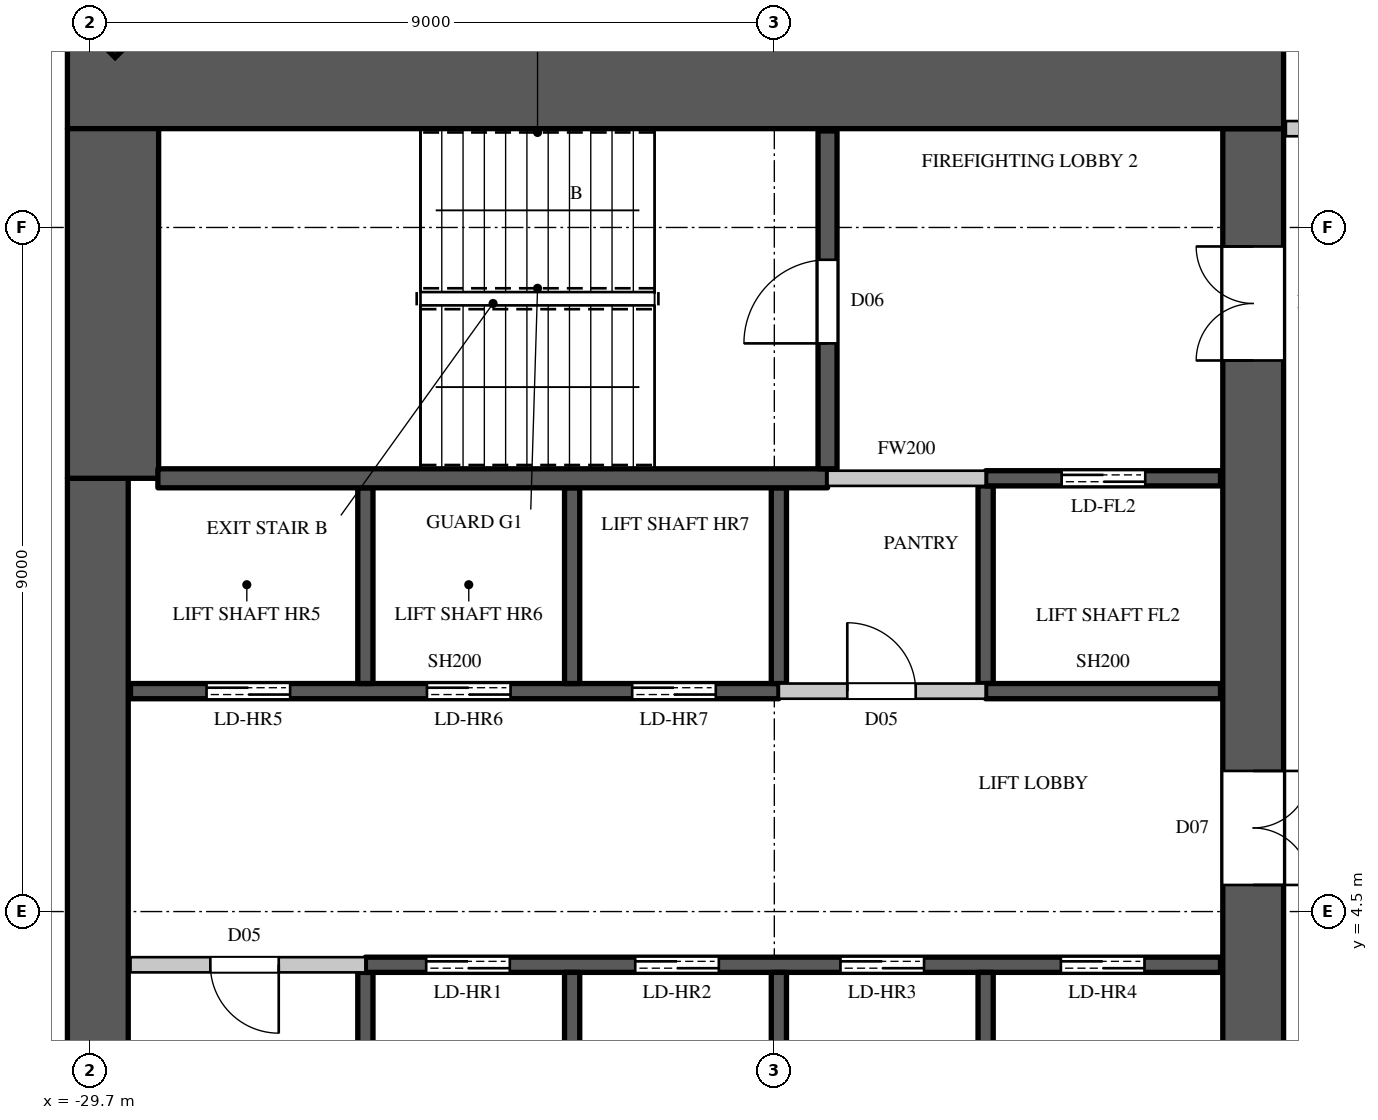
"""IFC4 building model, lengths in metres.
Left out: names, types, materials, properties, quantities, classifications, styles, units other than length and angle.
Written with IfcOpenShell. Run it as: python <this file> out.ifc"""

import sys

from ifc_helpers import new_model, si_unit, direction, frame, frame_2d, origin, origin_2d, place, context, subcontext, project, spatial, rectangle, extrude, element, fill, save


model = new_model("IFC4")
c1 = context("Model", 3, precision=1e-05, world=origin(), true_north=direction((0.0, 1.0)))
c2 = subcontext(c1, "Body", "Model", "MODEL_VIEW")
j1 = project(units=[si_unit("LENGTHUNIT", "METRE"), si_unit("PLANEANGLEUNIT", "RADIAN")], contexts=[c1])
p1 = place(None, origin())
s1 = spatial("IfcSite", under=j1, at=p1, CompositionType="ELEMENT")
p2 = place(p1, origin())
s2 = spatial("IfcBuilding", under=s1, at=p2, CompositionType="ELEMENT")
p3 = place(p2, frame((0.0, 0.0, 197.4)))
s3 = spatial("IfcBuildingStorey", under=s2, at=p3, CompositionType="ELEMENT", Elevation=197.4)
p4 = place(p3, frame((-29.443, 16.443, 0.0), z_axis=(0.0, 0.0, 1.0), x_axis=(-0.707106781187, -0.707106781187, 0.0)))
e1 = element("IfcColumn", 1, at=p4, inside=s3, PredefinedType="COLUMN", context=c2, shape_type="SweptSolid", body=[
    extrude(rectangle(XDim=0.9, YDim=1.1, at=origin_2d()), origin(), (0.0, 0.0, 1.0), 4.1),
])
p5 = place(p3, frame((-30.0, 15.4, 0.0), z_axis=(0.0, 0.0, 1.0), x_axis=(1.0, 0.0, 0.0)))
e2 = element("IfcWall", 2, at=p5, inside=s3, PredefinedType="SHEAR", context=c2, shape_type="SweptSolid", body=[
    extrude(rectangle(XDim=16.0, YDim=1.2, at=frame_2d((8.0, 0.0))), origin(), (0.0, 0.0, 1.0), 4.1),
])
p6 = place(p3, frame((-14.4, -14.8, 0.0), z_axis=(0.0, 0.0, 1.0), x_axis=(0.0, 1.0, 0.0)))
e3 = element("IfcWall", 3, at=p6, inside=s3, PredefinedType="SHEAR", context=c2, shape_type="SweptSolid", body=[
    extrude(rectangle(XDim=29.6, YDim=0.8, at=frame_2d((14.8, 0.0))), origin(), (0.0, 0.0, 1.0), 4.1),
])
p7 = place(p6, frame((1.55, 0.0, 0.0)))
e4 = element("IfcOpeningElement", 4, at=p7, cuts=e3, PredefinedType="OPENING", context=c2, shape_type="SweptSolid", body=[
    extrude(rectangle(XDim=1.5, YDim=2.4, at=frame_2d((0.75, 1.2))), frame((0.0, 0.41, 0.0), z_axis=(0.0, -1.0, 0.0), x_axis=(1.0, 0.0, 0.0)), (0.0, 0.0, 1.0), 0.82),
])
p8 = place(p6, frame((26.55, 0.0, 0.0)))
e5 = element("IfcOpeningElement", 5, at=p8, cuts=e3, PredefinedType="OPENING", context=c2, shape_type="SweptSolid", body=[
    extrude(rectangle(XDim=1.5, YDim=2.4, at=frame_2d((0.75, 1.2))), frame((0.0, 0.41, 0.0), z_axis=(0.0, -1.0, 0.0), x_axis=(1.0, 0.0, 0.0)), (0.0, 0.0, 1.0), 0.82),
])
p9 = place(p6, frame((8.45, 0.0, 0.0)))
e6 = element("IfcOpeningElement", 6, at=p9, cuts=e3, PredefinedType="OPENING", context=c2, shape_type="SweptSolid", body=[
    extrude(rectangle(XDim=1.5, YDim=2.4, at=frame_2d((0.75, 1.2))), frame((0.0, 0.41, 0.0), z_axis=(0.0, -1.0, 0.0), x_axis=(1.0, 0.0, 0.0)), (0.0, 0.0, 1.0), 0.82),
])
p10 = place(p6, frame((19.65, 0.0, 0.0)))
e7 = element("IfcOpeningElement", 7, at=p10, cuts=e3, PredefinedType="OPENING", context=c2, shape_type="SweptSolid", body=[
    extrude(rectangle(XDim=1.5, YDim=2.4, at=frame_2d((0.75, 1.2))), frame((0.0, 0.41, 0.0), z_axis=(0.0, -1.0, 0.0), x_axis=(1.0, 0.0, 0.0)), (0.0, 0.0, 1.0), 0.82),
])
p11 = place(p6, frame((14.5, 0.0, 0.0)))
e8 = element("IfcOpeningElement", 8, at=p11, cuts=e3, PredefinedType="OPENING", context=c2, shape_type="SweptSolid", body=[
    extrude(rectangle(XDim=0.6, YDim=2.0, at=frame_2d((0.3, 1.0))), frame((0.0, 0.41, 0.0), z_axis=(0.0, -1.0, 0.0), x_axis=(1.0, 0.0, 0.0)), (0.0, 0.0, 1.0), 0.82),
])
p12 = place(p3, frame((-29.6, -10.2, 0.0), z_axis=(0.0, 0.0, 1.0), x_axis=(0.0, 1.0, 0.0)))
e9 = element("IfcWall", 9, at=p12, inside=s3, PredefinedType="SHEAR", context=c2, shape_type="SweptSolid", body=[
    extrude(rectangle(XDim=20.4, YDim=0.8, at=frame_2d((10.2, 0.0))), origin(), (0.0, 0.0, 1.0), 4.1),
])
p13 = place(p3, frame((-29.4, 10.2, 0.0), z_axis=(0.0, 0.0, 1.0), x_axis=(0.0, 1.0, 0.0)))
e10 = element("IfcWall", 10, at=p13, inside=s3, PredefinedType="SHEAR", context=c2, shape_type="SweptSolid", body=[
    extrude(rectangle(XDim=4.6, YDim=1.2, at=frame_2d((2.3, 0.0))), origin(), (0.0, 0.0, 1.0), 4.1),
])
p14 = place(p3, frame((-29.17, 3.8, 0.0), z_axis=(0.0, 0.0, 1.0), x_axis=(1.0, 0.0, 0.0)))
e11 = element("IfcWall", 11, at=p14, inside=s3, PredefinedType="PARTITIONING", context=c2, shape_type="SweptSolid", body=[
    extrude(rectangle(XDim=3.09, YDim=0.2, at=frame_2d((1.545, 0.0))), origin(), (0.0, 0.0, 1.0), 3.8),
])
p15 = place(p14, frame((1.05, 0.0, 0.0)))
e12 = element("IfcOpeningElement", 12, at=p15, cuts=e11, PredefinedType="OPENING", context=c2, shape_type="SweptSolid", body=[
    extrude(rectangle(XDim=0.9, YDim=2.2, at=frame_2d((0.45, 1.1))), frame((0.0, 0.11, 0.0), z_axis=(0.0, -1.0, 0.0), x_axis=(1.0, 0.0, 0.0)), (0.0, 0.0, 1.0), 0.22),
])
p16 = place(p3, frame((-20.64, 7.4, 0.0), z_axis=(0.0, 0.0, 1.0), x_axis=(1.0, 0.0, 0.0)))
e13 = element("IfcWall", 13, at=p16, inside=s3, PredefinedType="PARTITIONING", context=c2, shape_type="SweptSolid", body=[
    extrude(rectangle(XDim=2.72, YDim=0.2, at=frame_2d((1.36, 0.0))), origin(), (0.0, 0.0, 1.0), 3.8),
])
p17 = place(p16, frame((0.9, 0.0, 0.0)))
e14 = element("IfcOpeningElement", 14, at=p17, cuts=e13, PredefinedType="OPENING", context=c2, shape_type="SweptSolid", body=[
    extrude(rectangle(XDim=0.9, YDim=2.2, at=frame_2d((0.45, 1.1))), frame((0.0, 0.11, 0.0), z_axis=(0.0, -1.0, 0.0), x_axis=(1.0, 0.0, 0.0)), (0.0, 0.0, 1.0), 0.22),
])
p18 = place(p3, frame((-20.0, 10.2, 0.0), z_axis=(0.0, 0.0, 1.0), x_axis=(1.0, 0.0, 0.0)))
e15 = element("IfcWall", 15, at=p18, inside=s3, PredefinedType="PARTITIONING", context=c2, shape_type="SweptSolid", body=[
    extrude(rectangle(XDim=2.08, YDim=0.2, at=frame_2d((1.04, 0.0))), origin(), (0.0, 0.0, 1.0), 3.8),
])
p19 = place(p3, frame((-13.97, 14.8, 0.0), z_axis=(0.0, 0.0, 1.0), x_axis=(1.0, 0.0, 0.0)))
e16 = element("IfcWall", 16, at=p19, inside=s3, PredefinedType="PARTITIONING", context=c2, shape_type="SweptSolid", body=[
    extrude(rectangle(XDim=2.87, YDim=0.2, at=frame_2d((1.435, 0.0))), origin(), (0.0, 0.0, 1.0), 3.8),
])
p20 = place(p3, frame((-29.17, 7.4, 0.0), z_axis=(0.0, 0.0, 1.0), x_axis=(1.0, 0.0, 0.0)))
e17 = element("IfcWall", 17, at=p20, inside=s3, PredefinedType="SHEAR", context=c2, shape_type="SweptSolid", body=[
    extrude(rectangle(XDim=8.53, YDim=0.2, at=frame_2d((4.265, 0.0))), origin(), (0.0, 0.0, 1.0), 3.8),
])
p21 = place(p20, frame((1.0, 0.0, 0.0)))
e18 = element("IfcOpeningElement", 18, at=p21, cuts=e17, PredefinedType="OPENING", context=c2, shape_type="SweptSolid", body=[
    extrude(rectangle(XDim=1.1, YDim=2.2, at=frame_2d((0.55, 1.1))), frame((0.0, 0.11, 0.0), z_axis=(0.0, -1.0, 0.0), x_axis=(1.0, 0.0, 0.0)), (0.0, 0.0, 1.0), 0.22),
])
p22 = place(p20, frame((3.9, 0.0, 0.0)))
e19 = element("IfcOpeningElement", 19, at=p22, cuts=e17, PredefinedType="OPENING", context=c2, shape_type="SweptSolid", body=[
    extrude(rectangle(XDim=1.1, YDim=2.2, at=frame_2d((0.55, 1.1))), frame((0.0, 0.11, 0.0), z_axis=(0.0, -1.0, 0.0), x_axis=(1.0, 0.0, 0.0)), (0.0, 0.0, 1.0), 0.22),
])
p23 = place(p20, frame((6.6, 0.0, 0.0)))
e20 = element("IfcOpeningElement", 20, at=p23, cuts=e17, PredefinedType="OPENING", context=c2, shape_type="SweptSolid", body=[
    extrude(rectangle(XDim=1.1, YDim=2.2, at=frame_2d((0.55, 1.1))), frame((0.0, 0.11, 0.0), z_axis=(0.0, -1.0, 0.0), x_axis=(1.0, 0.0, 0.0)), (0.0, 0.0, 1.0), 0.22),
])
p24 = place(p3, frame((-26.08, 1.1, 0.0), z_axis=(0.0, 0.0, 1.0), x_axis=(0.0, 1.0, 0.0)))
e21 = element("IfcWall", 21, at=p24, inside=s3, PredefinedType="SHEAR", context=c2, shape_type="SweptSolid", body=[
    extrude(rectangle(XDim=2.6, YDim=0.2, at=frame_2d((1.3, 0.0))), origin(), (0.0, 0.0, 1.0), 3.8),
])
p25 = place(p3, frame((-26.08, 3.8, 0.0), z_axis=(0.0, 0.0, 1.0), x_axis=(1.0, 0.0, 0.0)))
e22 = element("IfcWall", 22, at=p25, inside=s3, PredefinedType="SHEAR", context=c2, shape_type="SweptSolid", body=[
    extrude(rectangle(XDim=11.25, YDim=0.2, at=frame_2d((5.625, 0.0))), origin(), (0.0, 0.0, 1.0), 3.8),
])
p26 = place(p25, frame((0.8, 0.0, 0.0)))
e23 = element("IfcOpeningElement", 23, at=p26, cuts=e22, PredefinedType="OPENING", context=c2, shape_type="SweptSolid", body=[
    extrude(rectangle(XDim=1.1, YDim=2.2, at=frame_2d((0.55, 1.1))), frame((0.0, 0.11, 0.0), z_axis=(0.0, -1.0, 0.0), x_axis=(1.0, 0.0, 0.0)), (0.0, 0.0, 1.0), 0.22),
])
p27 = place(p25, frame((3.55, 0.0, 0.0)))
e24 = element("IfcOpeningElement", 24, at=p27, cuts=e22, PredefinedType="OPENING", context=c2, shape_type="SweptSolid", body=[
    extrude(rectangle(XDim=1.1, YDim=2.2, at=frame_2d((0.55, 1.1))), frame((0.0, 0.11, 0.0), z_axis=(0.0, -1.0, 0.0), x_axis=(1.0, 0.0, 0.0)), (0.0, 0.0, 1.0), 0.22),
])
p28 = place(p25, frame((6.25, 0.0, 0.0)))
e25 = element("IfcOpeningElement", 25, at=p28, cuts=e22, PredefinedType="OPENING", context=c2, shape_type="SweptSolid", body=[
    extrude(rectangle(XDim=1.1, YDim=2.2, at=frame_2d((0.55, 1.1))), frame((0.0, 0.11, 0.0), z_axis=(0.0, -1.0, 0.0), x_axis=(1.0, 0.0, 0.0)), (0.0, 0.0, 1.0), 0.22),
])
p29 = place(p25, frame((9.15, 0.0, 0.0)))
e26 = element("IfcOpeningElement", 26, at=p29, cuts=e22, PredefinedType="OPENING", context=c2, shape_type="SweptSolid", body=[
    extrude(rectangle(XDim=1.1, YDim=2.2, at=frame_2d((0.55, 1.1))), frame((0.0, 0.11, 0.0), z_axis=(0.0, -1.0, 0.0), x_axis=(1.0, 0.0, 0.0)), (0.0, 0.0, 1.0), 0.22),
])
p30 = place(p3, frame((-26.08, 7.5, 0.0), z_axis=(0.0, 0.0, 1.0), x_axis=(0.0, 1.0, 0.0)))
e27 = element("IfcWall", 27, at=p30, inside=s3, PredefinedType="SHEAR", context=c2, shape_type="SweptSolid", body=[
    extrude(rectangle(XDim=2.575, YDim=0.2, at=frame_2d((1.288, 0.0))), origin(), (0.0, 0.0, 1.0), 4.1),
])
p31 = place(p3, frame((-23.36, 1.1, 0.0), z_axis=(0.0, 0.0, 1.0), x_axis=(0.0, 1.0, 0.0)))
e28 = element("IfcWall", 28, at=p31, inside=s3, PredefinedType="SHEAR", context=c2, shape_type="SweptSolid", body=[
    extrude(rectangle(XDim=2.6, YDim=0.2, at=frame_2d((1.3, 0.0))), origin(), (0.0, 0.0, 1.0), 4.1),
])
p32 = place(p3, frame((-23.36, 7.5, 0.0), z_axis=(0.0, 0.0, 1.0), x_axis=(0.0, 1.0, 0.0)))
e29 = element("IfcWall", 29, at=p32, inside=s3, PredefinedType="SHEAR", context=c2, shape_type="SweptSolid", body=[
    extrude(rectangle(XDim=2.575, YDim=0.2, at=frame_2d((1.288, 0.0))), origin(), (0.0, 0.0, 1.0), 4.1),
])
p33 = place(p3, frame((-20.64, 1.1, 0.0), z_axis=(0.0, 0.0, 1.0), x_axis=(0.0, 1.0, 0.0)))
e30 = element("IfcWall", 30, at=p33, inside=s3, PredefinedType="SHEAR", context=c2, shape_type="SweptSolid", body=[
    extrude(rectangle(XDim=2.6, YDim=0.2, at=frame_2d((1.3, 0.0))), origin(), (0.0, 0.0, 1.0), 4.1),
])
p34 = place(p3, frame((-20.64, 7.5, 0.0), z_axis=(0.0, 0.0, 1.0), x_axis=(0.0, 1.0, 0.0)))
e31 = element("IfcWall", 31, at=p34, inside=s3, PredefinedType="SHEAR", context=c2, shape_type="SweptSolid", body=[
    extrude(rectangle(XDim=2.575, YDim=0.2, at=frame_2d((1.288, 0.0))), origin(), (0.0, 0.0, 1.0), 3.8),
])
p35 = place(p3, frame((-17.92, 1.1, 0.0), z_axis=(0.0, 0.0, 1.0), x_axis=(0.0, 1.0, 0.0)))
e32 = element("IfcWall", 32, at=p35, inside=s3, PredefinedType="SHEAR", context=c2, shape_type="SweptSolid", body=[
    extrude(rectangle(XDim=2.6, YDim=0.2, at=frame_2d((1.3, 0.0))), origin(), (0.0, 0.0, 1.0), 4.1),
])
p36 = place(p3, frame((-17.92, 7.5, 0.0), z_axis=(0.0, 0.0, 1.0), x_axis=(0.0, 1.0, 0.0)))
e33 = element("IfcWall", 33, at=p36, inside=s3, PredefinedType="SHEAR", context=c2, shape_type="SweptSolid", body=[
    extrude(rectangle(XDim=2.6, YDim=0.2, at=frame_2d((1.3, 0.0))), origin(), (0.0, 0.0, 1.0), 3.8),
])
p37 = place(p3, frame((-17.92, 7.4, 0.0), z_axis=(0.0, 0.0, 1.0), x_axis=(1.0, 0.0, 0.0)))
e34 = element("IfcWall", 34, at=p37, inside=s3, PredefinedType="SHEAR", context=c2, shape_type="SweptSolid", body=[
    extrude(rectangle(XDim=3.09, YDim=0.2, at=frame_2d((1.545, 0.0))), origin(), (0.0, 0.0, 1.0), 3.8),
])
p38 = place(p3, frame((-17.92, 10.2, 0.0), z_axis=(0.0, 0.0, 1.0), x_axis=(1.0, 0.0, 0.0)))
e35 = element("IfcWall", 35, at=p38, inside=s3, PredefinedType="SHEAR", context=c2, shape_type="SweptSolid", body=[
    extrude(rectangle(XDim=3.09, YDim=0.2, at=frame_2d((1.545, 0.0))), origin(), (0.0, 0.0, 1.0), 3.8),
])
p39 = place(p38, frame((1.0, 0.0, 0.0)))
e36 = element("IfcOpeningElement", 36, at=p39, cuts=e35, PredefinedType="OPENING", context=c2, shape_type="SweptSolid", body=[
    extrude(rectangle(XDim=1.1, YDim=2.2, at=frame_2d((0.55, 1.1))), frame((0.0, 0.11, 0.0), z_axis=(0.0, -1.0, 0.0), x_axis=(1.0, 0.0, 0.0)), (0.0, 0.0, 1.0), 0.22),
])
p40 = place(p3, frame((-28.81, 10.2, 0.0), z_axis=(0.0, 0.0, 1.0), x_axis=(1.0, 0.0, 0.0)))
e37 = element("IfcWall", 37, at=p40, inside=s3, PredefinedType="SHEAR", context=c2, shape_type="SweptSolid", body=[
    extrude(rectangle(XDim=8.81, YDim=0.25, at=frame_2d((4.405, 0.0))), origin(), (0.0, 0.0, 1.0), 3.8),
])
p41 = place(p3, frame((-20.0, 10.325, 0.0), z_axis=(0.0, 0.0, 1.0), x_axis=(0.0, 1.0, 0.0)))
e38 = element("IfcWall", 38, at=p41, inside=s3, PredefinedType="SHEAR", context=c2, shape_type="SweptSolid", body=[
    extrude(rectangle(XDim=4.445, YDim=0.25, at=frame_2d((2.223, 0.0))), origin(), (0.0, 0.0, 1.0), 3.8),
])
p42 = place(p41, frame((1.65, 0.0, 0.0)))
e39 = element("IfcOpeningElement", 39, at=p42, cuts=e38, PredefinedType="OPENING", context=c2, shape_type="SweptSolid", body=[
    extrude(rectangle(XDim=1.1, YDim=2.2, at=frame_2d((0.55, 1.1))), frame((0.0, 0.135, 0.0), z_axis=(0.0, -1.0, 0.0), x_axis=(1.0, 0.0, 0.0)), (0.0, 0.0, 1.0), 0.27),
])
p43 = place(p42, origin())
e40 = element("IfcDoor", 40, at=p43, inside=s3, OperationType="SINGLE_SWING_LEFT", PredefinedType="DOOR", context=c2, shape_type="SweptSolid", body=[
    extrude(rectangle(XDim=1.1, YDim=2.2, at=frame_2d((0.55, 1.1))), frame((0.0, 0.025, 0.0), z_axis=(0.0, -1.0, 0.0), x_axis=(1.0, 0.0, 0.0)), (0.0, 0.0, 1.0), 0.05),
])
fill(e39, e40)
p44 = place(p15, origin())
e41 = element("IfcDoor", 41, at=p44, inside=s3, OperationType="SINGLE_SWING_LEFT", PredefinedType="DOOR", context=c2, shape_type="SweptSolid", body=[
    extrude(rectangle(XDim=0.9, YDim=2.2, at=frame_2d((0.45, 1.1))), frame((0.0, 0.025, 0.0), z_axis=(0.0, -1.0, 0.0), x_axis=(1.0, 0.0, 0.0)), (0.0, 0.0, 1.0), 0.05),
])
fill(e12, e41)
p45 = place(p17, origin())
e42 = element("IfcDoor", 42, at=p45, inside=s3, OperationType="SINGLE_SWING_LEFT", PredefinedType="DOOR", context=c2, shape_type="SweptSolid", body=[
    extrude(rectangle(XDim=0.9, YDim=2.2, at=frame_2d((0.45, 1.1))), frame((0.0, 0.025, 0.0), z_axis=(0.0, -1.0, 0.0), x_axis=(1.0, 0.0, 0.0)), (0.0, 0.0, 1.0), 0.05),
])
fill(e14, e42)
p46 = place(p26, origin())
e43 = element("IfcDoor", 43, at=p46, inside=s3, OperationType="DOUBLE_DOOR_SLIDING", PredefinedType="DOOR", context=c2, shape_type="SweptSolid", body=[
    extrude(rectangle(XDim=1.1, YDim=2.2, at=frame_2d((0.55, 1.1))), frame((0.0, 0.025, 0.0), z_axis=(0.0, -1.0, 0.0), x_axis=(1.0, 0.0, 0.0)), (0.0, 0.0, 1.0), 0.05),
])
fill(e23, e43)
p47 = place(p27, origin())
e44 = element("IfcDoor", 44, at=p47, inside=s3, OperationType="DOUBLE_DOOR_SLIDING", PredefinedType="DOOR", context=c2, shape_type="SweptSolid", body=[
    extrude(rectangle(XDim=1.1, YDim=2.2, at=frame_2d((0.55, 1.1))), frame((0.0, 0.025, 0.0), z_axis=(0.0, -1.0, 0.0), x_axis=(1.0, 0.0, 0.0)), (0.0, 0.0, 1.0), 0.05),
])
fill(e24, e44)
p48 = place(p28, origin())
e45 = element("IfcDoor", 45, at=p48, inside=s3, OperationType="DOUBLE_DOOR_SLIDING", PredefinedType="DOOR", context=c2, shape_type="SweptSolid", body=[
    extrude(rectangle(XDim=1.1, YDim=2.2, at=frame_2d((0.55, 1.1))), frame((0.0, 0.025, 0.0), z_axis=(0.0, -1.0, 0.0), x_axis=(1.0, 0.0, 0.0)), (0.0, 0.0, 1.0), 0.05),
])
fill(e25, e45)
p49 = place(p29, origin())
e46 = element("IfcDoor", 46, at=p49, inside=s3, OperationType="DOUBLE_DOOR_SLIDING", PredefinedType="DOOR", context=c2, shape_type="SweptSolid", body=[
    extrude(rectangle(XDim=1.1, YDim=2.2, at=frame_2d((0.55, 1.1))), frame((0.0, 0.025, 0.0), z_axis=(0.0, -1.0, 0.0), x_axis=(1.0, 0.0, 0.0)), (0.0, 0.0, 1.0), 0.05),
])
fill(e26, e46)
p50 = place(p21, origin())
e47 = element("IfcDoor", 47, at=p50, inside=s3, OperationType="DOUBLE_DOOR_SLIDING", PredefinedType="DOOR", context=c2, shape_type="SweptSolid", body=[
    extrude(rectangle(XDim=1.1, YDim=2.2, at=frame_2d((0.55, 1.1))), frame((0.0, 0.025, 0.0), z_axis=(0.0, -1.0, 0.0), x_axis=(1.0, 0.0, 0.0)), (0.0, 0.0, 1.0), 0.05),
])
fill(e18, e47)
p51 = place(p22, origin())
e48 = element("IfcDoor", 48, at=p51, inside=s3, OperationType="DOUBLE_DOOR_SLIDING", PredefinedType="DOOR", context=c2, shape_type="SweptSolid", body=[
    extrude(rectangle(XDim=1.1, YDim=2.2, at=frame_2d((0.55, 1.1))), frame((0.0, 0.025, 0.0), z_axis=(0.0, -1.0, 0.0), x_axis=(1.0, 0.0, 0.0)), (0.0, 0.0, 1.0), 0.05),
])
fill(e19, e48)
p52 = place(p23, origin())
e49 = element("IfcDoor", 49, at=p52, inside=s3, OperationType="DOUBLE_DOOR_SLIDING", PredefinedType="DOOR", context=c2, shape_type="SweptSolid", body=[
    extrude(rectangle(XDim=1.1, YDim=2.2, at=frame_2d((0.55, 1.1))), frame((0.0, 0.025, 0.0), z_axis=(0.0, -1.0, 0.0), x_axis=(1.0, 0.0, 0.0)), (0.0, 0.0, 1.0), 0.05),
])
fill(e20, e49)
p53 = place(p39, origin())
e50 = element("IfcDoor", 50, at=p53, inside=s3, OperationType="DOUBLE_DOOR_SLIDING", PredefinedType="DOOR", context=c2, shape_type="SweptSolid", body=[
    extrude(rectangle(XDim=1.1, YDim=2.2, at=frame_2d((0.55, 1.1))), frame((0.0, 0.025, 0.0), z_axis=(0.0, -1.0, 0.0), x_axis=(1.0, 0.0, 0.0)), (0.0, 0.0, 1.0), 0.05),
])
fill(e36, e50)
p54 = place(p8, origin())
e51 = element("IfcDoor", 51, at=p54, inside=s3, OperationType="DOUBLE_DOOR_SINGLE_SWING", PredefinedType="DOOR", context=c2, shape_type="SweptSolid", body=[
    extrude(rectangle(XDim=1.5, YDim=2.4, at=frame_2d((0.75, 1.2))), frame((0.0, 0.395, 0.0), z_axis=(0.0, -1.0, 0.0), x_axis=(1.0, 0.0, 0.0)), (0.0, 0.0, 1.0), 0.05),
])
fill(e5, e51)
p55 = place(p10, origin())
e52 = element("IfcDoor", 52, at=p55, inside=s3, OperationType="DOUBLE_DOOR_SINGLE_SWING", PredefinedType="DOOR", context=c2, shape_type="SweptSolid", body=[
    extrude(rectangle(XDim=1.5, YDim=2.4, at=frame_2d((0.75, 1.2))), frame((0.0, -0.345, 0.0), z_axis=(0.0, -1.0, 0.0), x_axis=(1.0, 0.0, 0.0)), (0.0, 0.0, 1.0), 0.05),
])
fill(e7, e52)
save(model, sys.argv[1])
